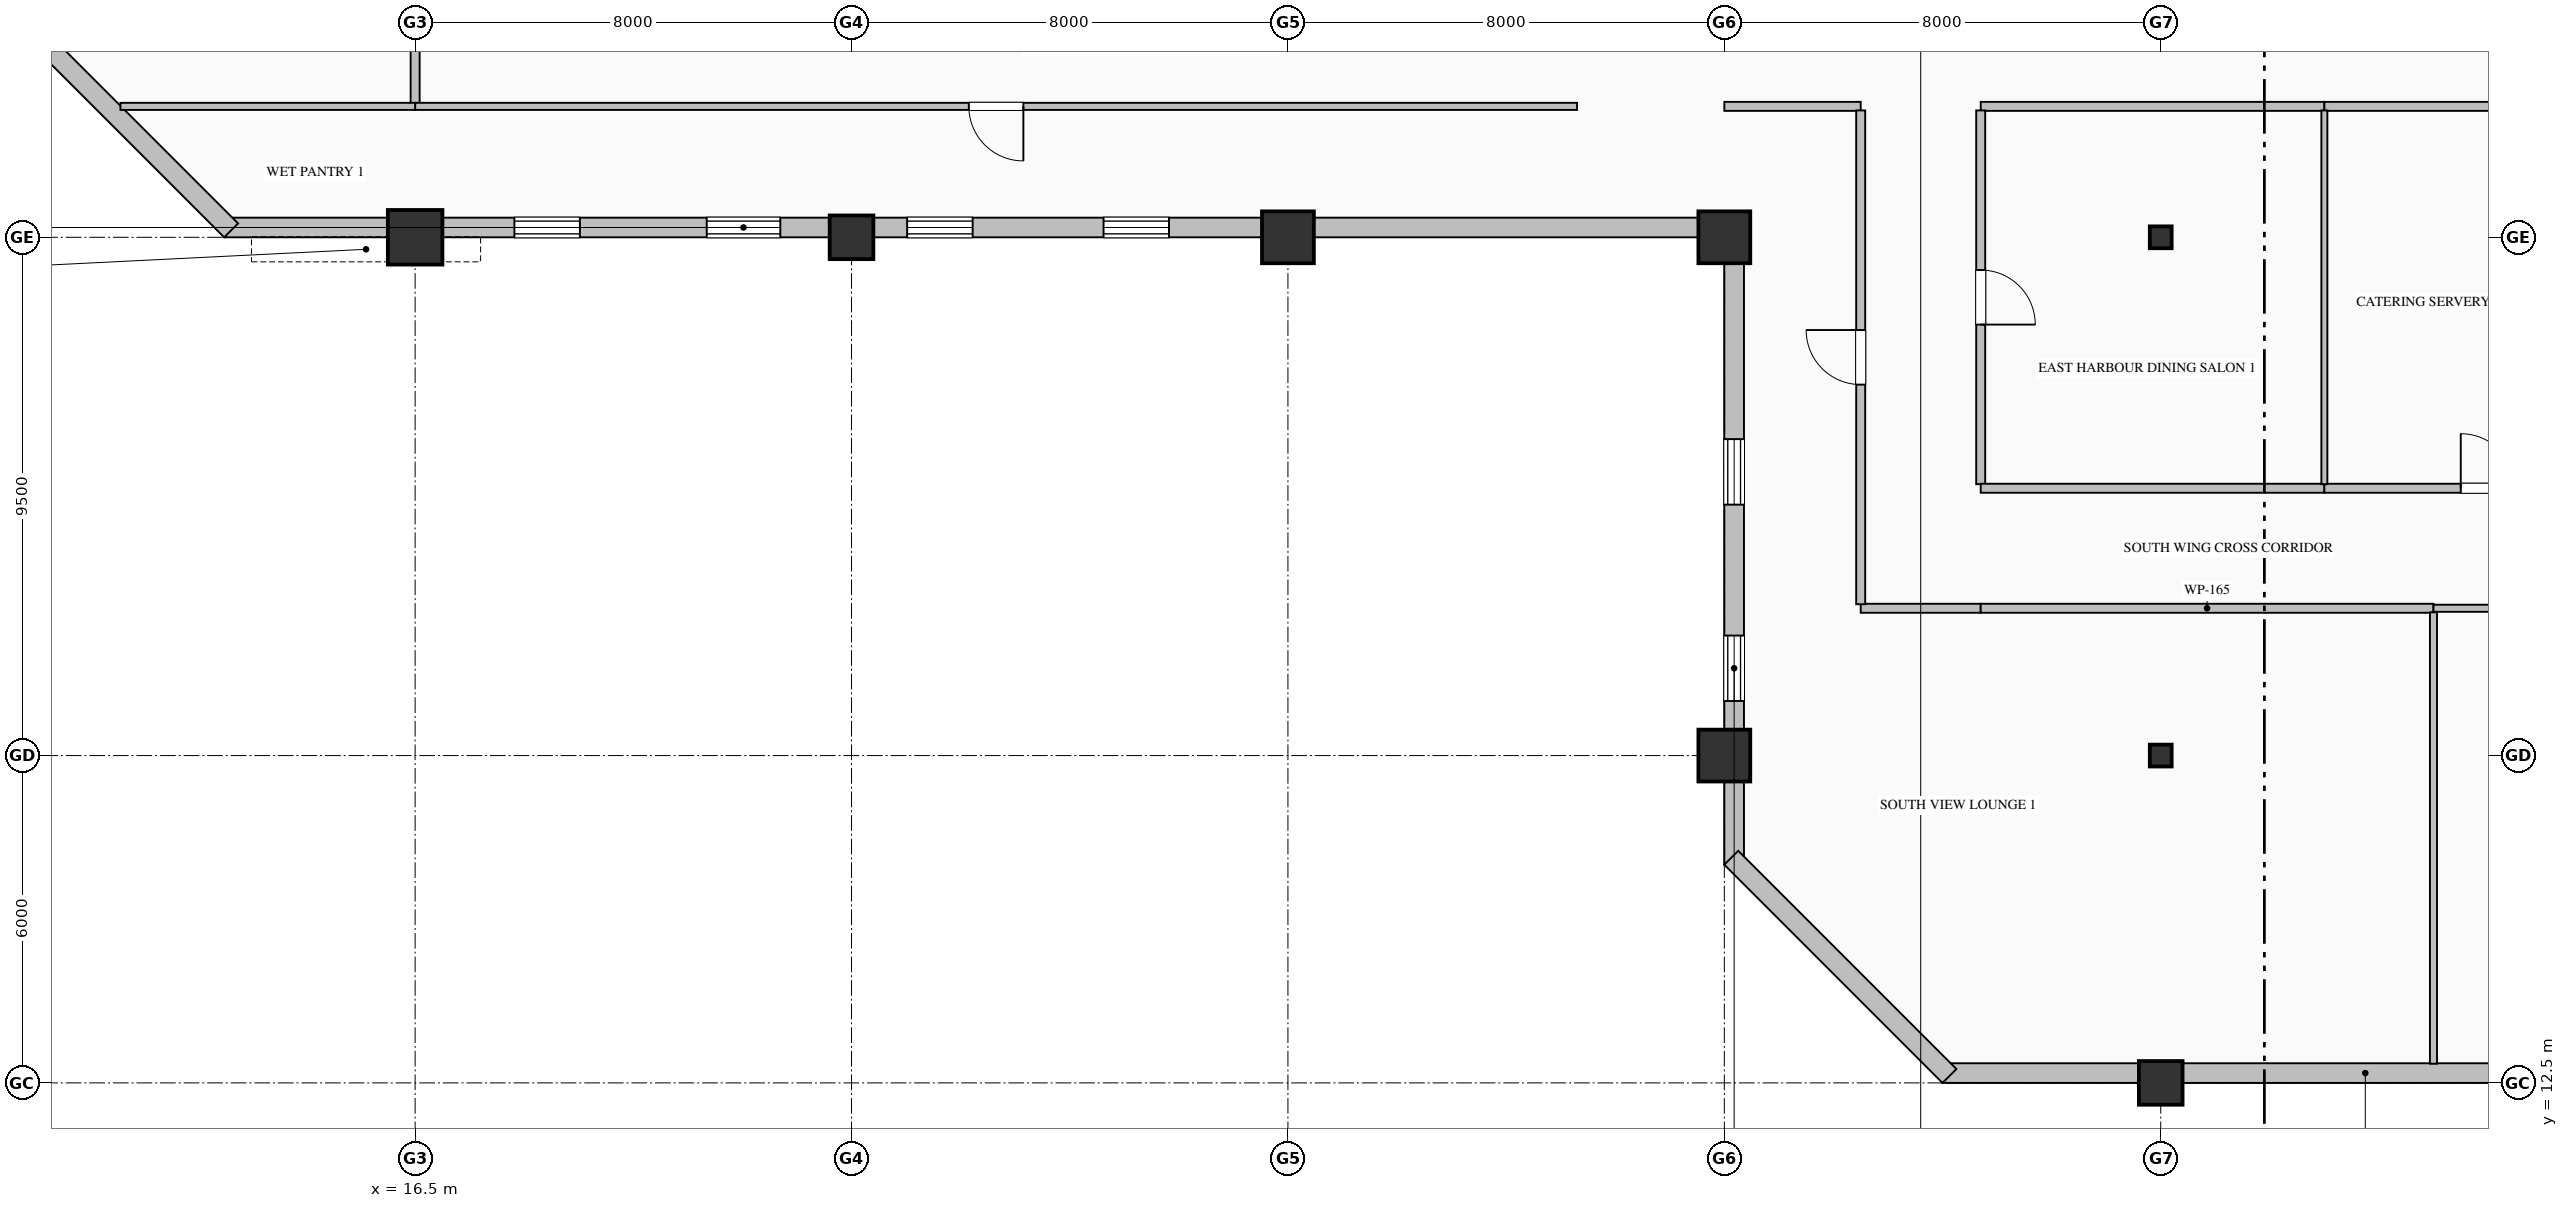
"""IFC4 building model, lengths in metres.
Left out: names, types, materials, properties, quantities, classifications, styles, units other than length and angle.
Written with IfcOpenShell. Run it as: python <this file> out.ifc"""

import sys

from ifc_helpers import new_model, si_unit, direction, frame, frame_2d, origin, origin_2d, place, context, subcontext, project, spatial, rectangle, hollow_rectangle, hollow_circle, i_section, extrude, element, fill, save


model = new_model("IFC4")
c1 = context("Model", 3, precision=1e-05, world=origin(), true_north=direction((0.0, 1.0)))
c2 = subcontext(c1, "Body", "Model", "MODEL_VIEW")
j1 = project(units=[si_unit("LENGTHUNIT", "METRE"), si_unit("PLANEANGLEUNIT", "RADIAN")], contexts=[c1])
p1 = place(None, origin())
s1 = spatial("IfcSite", under=j1, at=p1, CompositionType="ELEMENT")
p2 = place(p1, origin())
s2 = spatial("IfcBuilding", under=s1, at=p2, CompositionType="ELEMENT")
p3 = place(p2, frame((0.0, 0.0, 245.8)))
s3 = spatial("IfcBuildingStorey", under=s2, at=p3, CompositionType="ELEMENT", Elevation=245.8)
p4 = place(p3, frame((16.5, 28.0, 0.0), z_axis=(0.0, 0.0, 1.0), x_axis=(1.0, 0.0, 0.0)))
e1 = element("IfcColumn", 1, at=p4, inside=s3, PredefinedType="COLUMN", context=c2, shape_type="SweptSolid", body=[
    extrude(hollow_circle(Radius=0.5, WallThickness=0.036, at=origin_2d()), origin(), (0.0, 0.0, 1.0), 4.0),
])
p5 = place(p3, frame((24.5, 28.0, 0.0), z_axis=(0.0, 0.0, 1.0), x_axis=(1.0, 0.0, 0.0)))
e2 = element("IfcColumn", 2, at=p5, inside=s3, PredefinedType="COLUMN", context=c2, shape_type="SweptSolid", body=[
    extrude(hollow_rectangle(XDim=0.8, YDim=0.8, WallThickness=0.032, at=origin_2d()), origin(), (0.0, 0.0, 1.0), 4.0),
])
for number, where, z_axis, x_axis in (
    (3, (32.5, 28.0, 0.0), (0.0, 0.0, 1.0), (1.0, 0.0, 0.0)),
    (4, (40.5, 18.5, 0.0), (0.0, 0.0, 1.0), (1.0, 0.0, 0.0)),
    (5, (40.5, 28.0, 0.0), (0.0, 0.0, 1.0), (1.0, 0.0, 0.0)),
):
    element("IfcColumn", number, at=place(p3, frame(where, z_axis=z_axis, x_axis=x_axis)), inside=s3, PredefinedType="COLUMN", context=c2, shape_type="SweptSolid", body=[
        extrude(hollow_rectangle(XDim=0.95, YDim=0.95, WallThickness=0.036, at=origin_2d()), origin(), (0.0, 0.0, 1.0), 4.0),
    ])
p6 = place(p3, frame((48.5, 12.5, 0.0), z_axis=(0.0, 0.0, 1.0), x_axis=(1.0, 0.0, 0.0)))
e6 = element("IfcColumn", 6, at=p6, inside=s3, PredefinedType="COLUMN", context=c2, shape_type="SweptSolid", body=[
    extrude(hollow_rectangle(XDim=0.8, YDim=0.8, WallThickness=0.032, at=origin_2d()), origin(), (0.0, 0.0, 1.0), 4.0),
])
for number, where, z_axis, x_axis in (
    (7, (48.5, 18.5, 0.0), (0.0, 0.0, 1.0), (1.0, 0.0, 0.0)),
    (8, (48.5, 28.0, 0.0), (0.0, 0.0, 1.0), (1.0, 0.0, 0.0)),
):
    element("IfcColumn", number, at=place(p3, frame(where, z_axis=z_axis, x_axis=x_axis)), inside=s3, PredefinedType="COLUMN", context=c2, shape_type="SweptSolid", body=[
        extrude(i_section(OverallWidth=0.4, OverallDepth=0.4, WebThickness=0.013, FlangeThickness=0.021, FilletRadius=0.022, at=origin_2d()), origin(), (0.0, 0.0, 1.0), 4.0),
    ])
p7 = place(p3, frame((40.68, 16.5, 0.0), z_axis=(0.0, 0.0, 1.0), x_axis=(0.0, 1.0, 0.0)))
e9 = element("IfcWall", 9, at=p7, inside=s3, PredefinedType="SOLIDWALL", context=c2, shape_type="SweptSolid", body=[
    extrude(rectangle(XDim=11.86, YDim=0.36, at=frame_2d((5.93, 0.0))), origin(), (0.0, 0.0, 1.0), 3.187),
])
p8 = place(p7, frame((3.0, 0.0, 0.7)))
e10 = element("IfcOpeningElement", 10, at=p8, cuts=e9, PredefinedType="OPENING", context=c2, shape_type="SweptSolid", body=[
    extrude(rectangle(XDim=1.2, YDim=1.85, at=frame_2d((0.6, 0.925))), frame((0.0, 0.19, 0.0), z_axis=(0.0, -1.0, 0.0), x_axis=(1.0, 0.0, 0.0)), (0.0, 0.0, 1.0), 0.38),
])
p9 = place(p7, frame((6.6, 0.0, 0.9)))
e11 = element("IfcOpeningElement", 11, at=p9, cuts=e9, PredefinedType="OPENING", context=c2, shape_type="SweptSolid", body=[
    extrude(rectangle(XDim=1.2, YDim=1.85, at=frame_2d((0.6, 0.925))), frame((0.0, 0.19, 0.0), z_axis=(0.0, -1.0, 0.0), x_axis=(1.0, 0.0, 0.0)), (0.0, 0.0, 1.0), 0.38),
])
p10 = place(p3, frame((40.52, 28.18, 0.0), z_axis=(0.0, 0.0, 1.0), x_axis=(-1.0, 0.0, 0.0)))
e12 = element("IfcWall", 12, at=p10, inside=s3, PredefinedType="SOLIDWALL", context=c2, shape_type="SweptSolid", body=[
    extrude(rectangle(XDim=27.52, YDim=0.36, at=frame_2d((13.76, 0.0))), origin(), (0.0, 0.0, 1.0), 3.187),
])
p11 = place(p10, frame((10.2, 0.0, 0.7)))
e13 = element("IfcOpeningElement", 13, at=p11, cuts=e12, PredefinedType="OPENING", context=c2, shape_type="SweptSolid", body=[
    extrude(rectangle(XDim=1.2, YDim=1.85, at=frame_2d((0.6, 0.925))), frame((0.0, 0.19, 0.0), z_axis=(0.0, -1.0, 0.0), x_axis=(1.0, 0.0, 0.0)), (0.0, 0.0, 1.0), 0.38),
])
p12 = place(p10, frame((13.8, 0.0, 0.9)))
e14 = element("IfcOpeningElement", 14, at=p12, cuts=e12, PredefinedType="OPENING", context=c2, shape_type="SweptSolid", body=[
    extrude(rectangle(XDim=1.2, YDim=1.85, at=frame_2d((0.6, 0.925))), frame((0.0, 0.19, 0.0), z_axis=(0.0, -1.0, 0.0), x_axis=(1.0, 0.0, 0.0)), (0.0, 0.0, 1.0), 0.38),
])
p13 = place(p10, frame((17.325, 0.0, 0.9)))
e15 = element("IfcOpeningElement", 15, at=p13, cuts=e12, PredefinedType="OPENING", context=c2, shape_type="SweptSolid", body=[
    extrude(rectangle(XDim=1.35, YDim=1.85, at=frame_2d((0.675, 0.925))), frame((0.0, 0.19, 0.0), z_axis=(0.0, -1.0, 0.0), x_axis=(1.0, 0.0, 0.0)), (0.0, 0.0, 1.0), 0.38),
])
p14 = place(p10, frame((21.0, 0.0, 0.7)))
e16 = element("IfcOpeningElement", 16, at=p14, cuts=e12, PredefinedType="OPENING", context=c2, shape_type="SweptSolid", body=[
    extrude(rectangle(XDim=1.2, YDim=1.85, at=frame_2d((0.6, 0.925))), frame((0.0, 0.19, 0.0), z_axis=(0.0, -1.0, 0.0), x_axis=(1.0, 0.0, 0.0)), (0.0, 0.0, 1.0), 0.38),
])
p15 = place(p3, frame((13.127, 28.127, 0.0), z_axis=(0.0, 0.0, 1.0), x_axis=(-0.707106781187, 0.707106781187, 0.0)))
e17 = element("IfcWall", 17, at=p15, inside=s3, PredefinedType="SOLIDWALL", context=c2, shape_type="SweptSolid", body=[
    extrude(rectangle(XDim=5.657, YDim=0.36, at=frame_2d((2.828, 0.0))), origin(), (0.0, 0.0, 1.0), 3.775),
])
p16 = place(p3, frame((60.0, 12.68, 0.0), z_axis=(0.0, 0.0, 1.0), x_axis=(-1.0, 0.0, 0.0)))
e18 = element("IfcWall", 18, at=p16, inside=s3, PredefinedType="SOLIDWALL", context=c2, shape_type="SweptSolid", body=[
    extrude(rectangle(XDim=15.5, YDim=0.36, at=frame_2d((7.75, 0.0))), origin(), (0.0, 0.0, 1.0), 3.325),
])
p17 = place(p3, frame((44.627, 12.627, 0.0), z_axis=(0.0, 0.0, 1.0), x_axis=(-0.707106781187, 0.707106781187, 0.0)))
e19 = element("IfcWall", 19, at=p17, inside=s3, PredefinedType="SOLIDWALL", context=c2, shape_type="SweptSolid", body=[
    extrude(rectangle(XDim=5.657, YDim=0.36, at=frame_2d((2.828, 0.0))), origin(), (0.0, 0.0, 1.0), 3.775),
])
p18 = place(p3, frame((16.5, 30.457, 0.0), z_axis=(0.0, 0.0, 1.0), x_axis=(0.0, 1.0, 0.0)))
e20 = element("IfcWall", 20, at=p18, inside=s3, PredefinedType="PARTITIONING", context=c2, shape_type="SweptSolid", body=[
    extrude(rectangle(XDim=2.068, YDim=0.165, at=frame_2d((1.034, 0.0))), origin(), (0.0, 0.0, 1.0), 3.179),
])
p19 = place(p3, frame((37.8, 30.4, 0.0), z_axis=(0.0, 0.0, 1.0), x_axis=(-1.0, 0.0, 0.0)))
e21 = element("IfcWall", 21, at=p19, inside=s3, PredefinedType="PARTITIONING", context=c2, shape_type="SweptSolid", body=[
    extrude(rectangle(XDim=21.3, YDim=0.13, at=frame_2d((10.65, 0.0))), origin(), (0.0, 0.0, 1.0), 3.775),
])
p20 = place(p19, frame((10.15, 0.0, 0.0)))
e22 = element("IfcOpeningElement", 22, at=p20, cuts=e21, PredefinedType="OPENING", context=c2, shape_type="SweptSolid", body=[
    extrude(rectangle(XDim=1.0, YDim=2.15, at=frame_2d((0.5, 1.075))), frame((0.0, 0.075, 0.0), z_axis=(0.0, -1.0, 0.0), x_axis=(1.0, 0.0, 0.0)), (0.0, 0.0, 1.0), 0.15),
])
p21 = place(p3, frame((51.5, 30.4, 0.0), z_axis=(0.0, 0.0, 1.0), x_axis=(-1.0, 0.0, 0.0)))
e23 = element("IfcWall", 23, at=p21, inside=s3, PredefinedType="PARTITIONING", context=c2, shape_type="SweptSolid", body=[
    extrude(rectangle(XDim=6.3, YDim=0.165, at=frame_2d((3.15, 0.0))), origin(), (0.0, 0.0, 1.0), 3.775),
])
p22 = place(p3, frame((56.5, 30.4, 0.0), z_axis=(0.0, 0.0, 1.0), x_axis=(-1.0, 0.0, 0.0)))
e24 = element("IfcWall", 24, at=p22, inside=s3, PredefinedType="PARTITIONING", context=c2, shape_type="SweptSolid", body=[
    extrude(rectangle(XDim=5.0, YDim=0.165, at=frame_2d((2.5, 0.0))), origin(), (0.0, 0.0, 1.0), 3.775),
])
p23 = place(p3, frame((43.0, 30.4, 0.0), z_axis=(0.0, 0.0, 1.0), x_axis=(-1.0, 0.0, 0.0)))
e25 = element("IfcWall", 25, at=p23, inside=s3, PredefinedType="PARTITIONING", context=c2, shape_type="SweptSolid", body=[
    extrude(rectangle(XDim=2.5, YDim=0.165, at=frame_2d((1.25, 0.0))), origin(), (0.0, 0.0, 1.0), 3.775),
])
p24 = place(p3, frame((45.2, 30.325, 0.0), z_axis=(0.0, 0.0, 1.0), x_axis=(0.0, -1.0, 0.0)))
e26 = element("IfcWall", 26, at=p24, inside=s3, PredefinedType="PARTITIONING", context=c2, shape_type="SweptSolid", body=[
    extrude(rectangle(XDim=6.851, YDim=0.165, at=frame_2d((3.425, 0.0))), origin(), (0.0, 0.0, 1.0), 3.775),
])
p25 = place(p24, frame((2.926, 0.0, 0.0)))
e27 = element("IfcOpeningElement", 27, at=p25, cuts=e26, PredefinedType="OPENING", context=c2, shape_type="SweptSolid", body=[
    extrude(rectangle(XDim=1.0, YDim=2.15, at=frame_2d((0.5, 1.075))), frame((0.0, 0.093, 0.0), z_axis=(0.0, -1.0, 0.0), x_axis=(1.0, 0.0, 0.0)), (0.0, 0.0, 1.0), 0.185),
])
p26 = place(p3, frame((45.2, 21.2, 0.0), z_axis=(0.0, 0.0, 1.0), x_axis=(-1.0, 0.0, 0.0)))
e28 = element("IfcWall", 28, at=p26, inside=s3, PredefinedType="PARTITIONING", context=c2, shape_type="SweptSolid", body=[
    extrude(rectangle(XDim=2.2, YDim=0.165, at=frame_2d((1.1, 0.0))), origin(), (0.0, 0.0, 1.0), 3.775),
])
p27 = place(p3, frame((43.0, 21.274, 0.0), z_axis=(0.0, 0.0, 1.0), x_axis=(0.0, 1.0, 0.0)))
e29 = element("IfcWall", 29, at=p27, inside=s3, PredefinedType="PARTITIONING", context=c2, shape_type="SweptSolid", body=[
    extrude(rectangle(XDim=9.051, YDim=0.165, at=frame_2d((4.525, 0.0))), origin(), (0.0, 0.0, 1.0), 3.775),
])
p28 = place(p27, frame((4.025, 0.0, 0.0)))
e30 = element("IfcOpeningElement", 30, at=p28, cuts=e29, PredefinedType="OPENING", context=c2, shape_type="SweptSolid", body=[
    extrude(rectangle(XDim=1.0, YDim=2.15, at=frame_2d((0.5, 1.075))), frame((0.0, 0.093, 0.0), z_axis=(0.0, -1.0, 0.0), x_axis=(1.0, 0.0, 0.0)), (0.0, 0.0, 1.0), 0.185),
])
p29 = place(p3, frame((45.2, 23.4, 0.0), z_axis=(0.0, 0.0, 1.0), x_axis=(1.0, 0.0, 0.0)))
e31 = element("IfcWall", 31, at=p29, inside=s3, PredefinedType="PARTITIONING", context=c2, shape_type="SweptSolid", body=[
    extrude(rectangle(XDim=6.3, YDim=0.165, at=frame_2d((3.15, 0.0))), origin(), (0.0, 0.0, 1.0), 3.467),
])
p30 = place(p3, frame((51.5, 23.4, 0.0), z_axis=(0.0, 0.0, 1.0), x_axis=(1.0, 0.0, 0.0)))
e32 = element("IfcWall", 32, at=p30, inside=s3, PredefinedType="PARTITIONING", context=c2, shape_type="SweptSolid", body=[
    extrude(rectangle(XDim=6.0, YDim=0.165, at=frame_2d((3.0, 0.0))), origin(), (0.0, 0.0, 1.0), 3.467),
])
p31 = place(p30, frame((2.5, 0.0, 0.0)))
e33 = element("IfcOpeningElement", 33, at=p31, cuts=e32, PredefinedType="OPENING", context=c2, shape_type="SweptSolid", body=[
    extrude(rectangle(XDim=1.0, YDim=2.15, at=frame_2d((0.5, 1.075))), frame((0.0, 0.093, 0.0), z_axis=(0.0, -1.0, 0.0), x_axis=(1.0, 0.0, 0.0)), (0.0, 0.0, 1.0), 0.185),
])
p32 = place(p3, frame((53.5, 21.2, 0.0), z_axis=(0.0, 0.0, 1.0), x_axis=(-1.0, 0.0, 0.0)))
e34 = element("IfcWall", 34, at=p32, inside=s3, PredefinedType="PARTITIONING", context=c2, shape_type="SweptSolid", body=[
    extrude(rectangle(XDim=8.3, YDim=0.165, at=frame_2d((4.15, 0.0))), origin(), (0.0, 0.0, 1.0), 3.775),
])
p33 = place(p3, frame((58.0, 21.2, 0.0), z_axis=(0.0, 0.0, 1.0), x_axis=(-1.0, 0.0, 0.0)))
e35 = element("IfcWall", 35, at=p33, inside=s3, PredefinedType="PARTITIONING", context=c2, shape_type="SweptSolid", body=[
    extrude(rectangle(XDim=4.5, YDim=0.13, at=frame_2d((2.25, 0.0))), origin(), (0.0, 0.0, 1.0), 3.775),
])
p34 = place(p33, frame((1.75, 0.0, 0.0)))
e36 = element("IfcOpeningElement", 36, at=p34, cuts=e35, PredefinedType="OPENING", context=c2, shape_type="SweptSolid", body=[
    extrude(rectangle(XDim=1.0, YDim=2.15, at=frame_2d((0.5, 1.075))), frame((0.0, 0.075, 0.0), z_axis=(0.0, -1.0, 0.0), x_axis=(1.0, 0.0, 0.0)), (0.0, 0.0, 1.0), 0.15),
])
p35 = place(p3, frame((16.5, 30.4, 0.0), z_axis=(0.0, 0.0, 1.0), x_axis=(-1.0, 0.0, 0.0)))
e37 = element("IfcWall", 37, at=p35, inside=s3, PredefinedType="PARTITIONING", context=c2, shape_type="SweptSolid", body=[
    extrude(rectangle(XDim=5.402, YDim=0.13, at=frame_2d((2.701, 0.0))), origin(), (0.0, 0.0, 1.0), 3.775),
])
p36 = place(p3, frame((51.5, 30.325, 0.0), z_axis=(0.0, 0.0, 1.0), x_axis=(0.0, -1.0, 0.0)))
e38 = element("IfcWall", 38, at=p36, inside=s3, PredefinedType="MOVABLE", context=c2, shape_type="SweptSolid", body=[
    extrude(rectangle(XDim=6.851, YDim=0.11, at=frame_2d((3.425, 0.0))), origin(), (0.0, 0.0, 1.0), 3.775),
])
p37 = place(p3, frame((53.5, 21.125, 0.0), z_axis=(0.0, 0.0, 1.0), x_axis=(0.0, -1.0, 0.0)))
e39 = element("IfcWall", 39, at=p37, inside=s3, PredefinedType="PARTITIONING", context=c2, shape_type="SweptSolid", body=[
    extrude(rectangle(XDim=8.273, YDim=0.13, at=frame_2d((4.137, 0.0))), origin(), (0.0, 0.0, 1.0), 3.775),
])
p38 = place(p8, origin())
e40 = element("IfcWindow", 40, at=p38, inside=s3, PartitioningType="DOUBLE_PANEL_VERTICAL", PredefinedType="WINDOW", context=c2, shape_type="SweptSolid", body=[
    extrude(rectangle(XDim=1.2, YDim=1.85, at=frame_2d((0.6, 0.925))), frame((0.0, 0.15, 0.0), z_axis=(0.0, -1.0, 0.0), x_axis=(1.0, 0.0, 0.0)), (0.0, 0.0, 1.0), 0.06),
])
fill(e10, e40)
p39 = place(p9, origin())
e41 = element("IfcWindow", 41, at=p39, inside=s3, PartitioningType="DOUBLE_PANEL_VERTICAL", PredefinedType="WINDOW", context=c2, shape_type="SweptSolid", body=[
    extrude(rectangle(XDim=1.2, YDim=1.85, at=frame_2d((0.6, 0.925))), frame((0.0, 0.15, 0.0), z_axis=(0.0, -1.0, 0.0), x_axis=(1.0, 0.0, 0.0)), (0.0, 0.0, 1.0), 0.06),
])
fill(e11, e41)
p40 = place(p11, origin())
e42 = element("IfcWindow", 42, at=p40, inside=s3, PartitioningType="DOUBLE_PANEL_VERTICAL", PredefinedType="WINDOW", context=c2, shape_type="SweptSolid", body=[
    extrude(rectangle(XDim=1.2, YDim=1.85, at=frame_2d((0.6, 0.925))), frame((0.0, 0.15, 0.0), z_axis=(0.0, -1.0, 0.0), x_axis=(1.0, 0.0, 0.0)), (0.0, 0.0, 1.0), 0.06),
])
fill(e13, e42)
p41 = place(p12, origin())
e43 = element("IfcWindow", 43, at=p41, inside=s3, PartitioningType="DOUBLE_PANEL_VERTICAL", PredefinedType="WINDOW", context=c2, shape_type="SweptSolid", body=[
    extrude(rectangle(XDim=1.2, YDim=1.85, at=frame_2d((0.6, 0.925))), frame((0.0, 0.15, 0.0), z_axis=(0.0, -1.0, 0.0), x_axis=(1.0, 0.0, 0.0)), (0.0, 0.0, 1.0), 0.06),
])
fill(e14, e43)
p42 = place(p13, origin())
e44 = element("IfcWindow", 44, at=p42, inside=s3, PartitioningType="DOUBLE_PANEL_VERTICAL", PredefinedType="WINDOW", context=c2, shape_type="SweptSolid", body=[
    extrude(rectangle(XDim=1.35, YDim=1.85, at=frame_2d((0.675, 0.925))), frame((0.0, 0.15, 0.0), z_axis=(0.0, -1.0, 0.0), x_axis=(1.0, 0.0, 0.0)), (0.0, 0.0, 1.0), 0.06),
])
fill(e15, e44)
p43 = place(p14, origin())
e45 = element("IfcWindow", 45, at=p43, inside=s3, PartitioningType="DOUBLE_PANEL_VERTICAL", PredefinedType="WINDOW", context=c2, shape_type="SweptSolid", body=[
    extrude(rectangle(XDim=1.2, YDim=1.85, at=frame_2d((0.6, 0.925))), frame((0.0, 0.15, 0.0), z_axis=(0.0, -1.0, 0.0), x_axis=(1.0, 0.0, 0.0)), (0.0, 0.0, 1.0), 0.06),
])
fill(e16, e45)
p44 = place(p25, origin())
e46 = element("IfcDoor", 46, at=p44, inside=s3, OperationType="SINGLE_SWING_RIGHT", PredefinedType="DOOR", context=c2, shape_type="SweptSolid", body=[
    extrude(rectangle(XDim=1.0, YDim=2.15, at=frame_2d((0.5, 1.075))), frame((0.0, 0.025, 0.0), z_axis=(0.0, -1.0, 0.0), x_axis=(1.0, 0.0, 0.0)), (0.0, 0.0, 1.0), 0.05),
])
fill(e27, e46)
p45 = place(p31, origin())
e47 = element("IfcDoor", 47, at=p45, inside=s3, OperationType="SINGLE_SWING_LEFT", PredefinedType="DOOR", context=c2, shape_type="SweptSolid", body=[
    extrude(rectangle(XDim=1.0, YDim=2.15, at=frame_2d((0.5, 1.075))), frame((0.0, 0.025, 0.0), z_axis=(0.0, -1.0, 0.0), x_axis=(1.0, 0.0, 0.0)), (0.0, 0.0, 1.0), 0.05),
])
fill(e33, e47)
p46 = place(p20, origin())
e48 = element("IfcDoor", 48, at=p46, inside=s3, OperationType="SINGLE_SWING_LEFT", PredefinedType="DOOR", context=c2, shape_type="SweptSolid", body=[
    extrude(rectangle(XDim=1.0, YDim=2.15, at=frame_2d((0.5, 1.075))), frame((0.0, 0.025, 0.0), z_axis=(0.0, -1.0, 0.0), x_axis=(1.0, 0.0, 0.0)), (0.0, 0.0, 1.0), 0.05),
])
fill(e22, e48)
p47 = place(p28, origin())
e49 = element("IfcDoor", 49, at=p47, inside=s3, OperationType="SINGLE_SWING_RIGHT", PredefinedType="DOOR", context=c2, shape_type="SweptSolid", body=[
    extrude(rectangle(XDim=1.0, YDim=2.15, at=frame_2d((0.5, 1.075))), frame((0.0, 0.025, 0.0), z_axis=(0.0, -1.0, 0.0), x_axis=(1.0, 0.0, 0.0)), (0.0, 0.0, 1.0), 0.05),
])
fill(e30, e49)
save(model, sys.argv[1])
